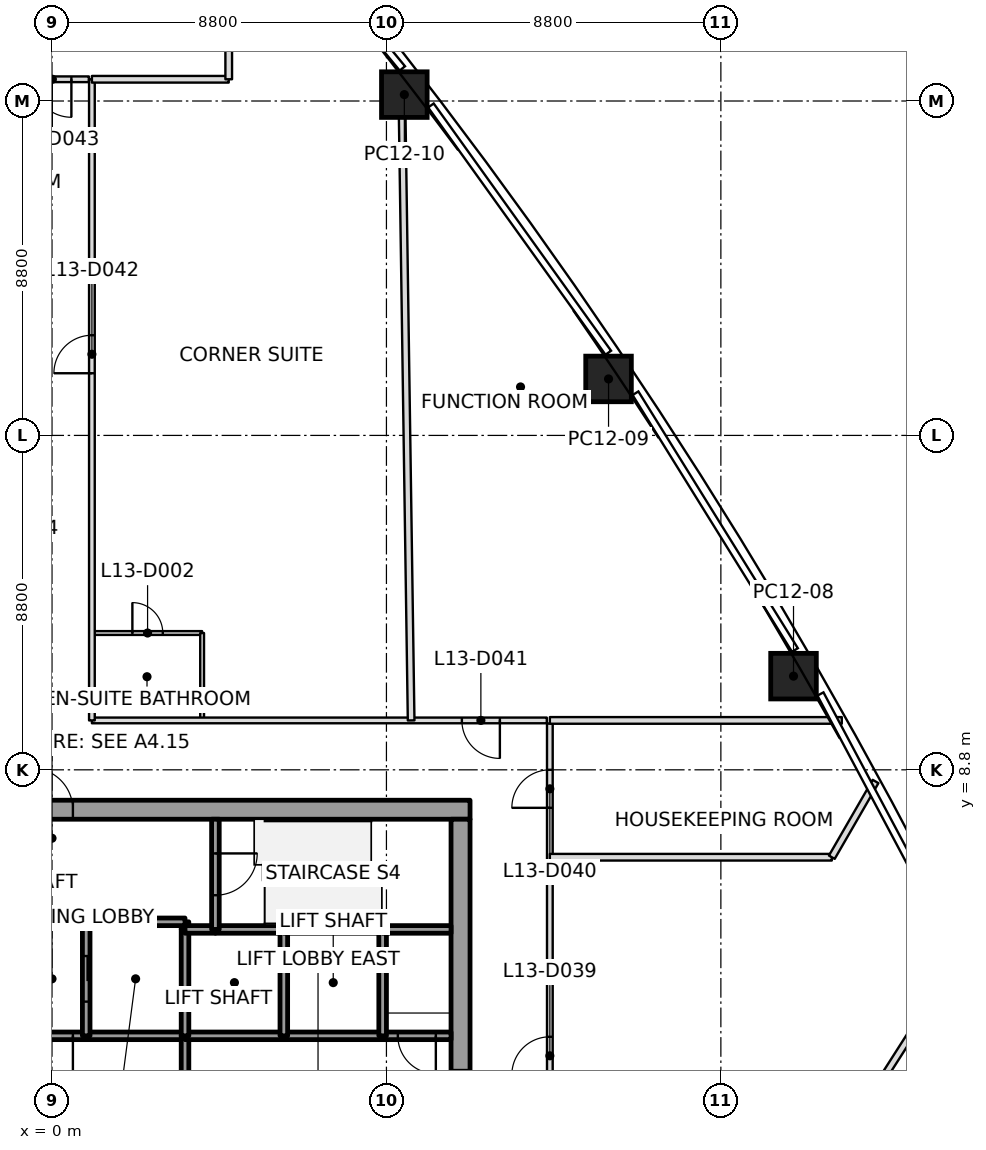
"""IFC4 building model, lengths in metres.
Left out: names, types, materials, properties, quantities, classifications, styles, units other than length and angle.
Written with IfcOpenShell. Run it as: python <this file> out.ifc"""

import sys

from ifc_helpers import new_model, si_unit, direction, frame, frame_2d, origin, origin_2d, place, context, subcontext, project, spatial, rectangle, extrude, element, fill, save


model = new_model("IFC4")
c1 = context("Model", 3, precision=1e-05, world=origin(), true_north=direction((0.0, 1.0)))
c2 = subcontext(c1, "Body", "Model", "MODEL_VIEW")
j1 = project(units=[si_unit("LENGTHUNIT", "METRE"), si_unit("PLANEANGLEUNIT", "RADIAN")], contexts=[c1])
p1 = place(None, origin())
s1 = spatial("IfcSite", under=j1, at=p1, CompositionType="ELEMENT")
p2 = place(p1, origin())
s2 = spatial("IfcBuilding", under=s1, at=p2, CompositionType="ELEMENT")
p3 = place(p2, frame((0.0, 0.0, 70.2)))
s3 = spatial("IfcBuildingStorey", under=s2, at=p3, CompositionType="ELEMENT", Elevation=70.2)
p4 = place(p3, frame((19.512, 11.265, 0.0), z_axis=(-0.010754701703, -0.006136118149, 0.999923339284), x_axis=(-0.499971083262, 0.866042095943, -6.290806e-05)))
e1 = element("IfcColumn", 1, at=p4, inside=s3, PredefinedType="COLUMN", context=c2, shape_type="SweptSolid", body=[
    extrude(rectangle(XDim=1.2, YDim=1.2, at=origin_2d()), origin(), (0.0, 0.0, 1.0), 3.7),
])
p5 = place(p3, frame((14.644, 19.086, 0.0), z_axis=(-0.005674011074, -0.014448935178, 0.999879509676), x_axis=(-0.556135818375, 0.831044265652, 0.008853250663)))
e2 = element("IfcColumn", 2, at=p5, inside=s3, PredefinedType="COLUMN", context=c2, shape_type="SweptSolid", body=[
    extrude(rectangle(XDim=1.2, YDim=1.2, at=origin_2d()), origin(), (0.0, 0.0, 1.0), 3.7),
])
p6 = place(p3, frame((9.271, 26.568, 0.0), z_axis=(-0.000263873276, -0.02236326018, 0.999749876202), x_axis=(-0.609857478762, 0.792316491726, 0.017562247495)))
e3 = element("IfcColumn", 3, at=p6, inside=s3, PredefinedType="COLUMN", context=c2, shape_type="SweptSolid", body=[
    extrude(rectangle(XDim=1.2, YDim=1.2, at=origin_2d()), origin(), (0.0, 0.0, 1.0), 3.701),
])
p7 = place(p3, frame((-11.0, 7.75, 0.0), z_axis=(0.0, 0.0, 1.0), x_axis=(1.0, 0.0, 0.0)))
e4 = element("IfcWall", 4, at=p7, inside=s3, PredefinedType="SHEAR", context=c2, shape_type="SweptSolid", body=[
    extrude(rectangle(XDim=22.0, YDim=0.5, at=frame_2d((11.0, 0.0))), origin(), (0.0, 0.0, 1.0), 3.7),
])
p8 = place(p7, frame((10.45, 0.0, 0.0)))
e5 = element("IfcOpeningElement", 5, at=p8, cuts=e4, PredefinedType="OPENING", context=c2, shape_type="SweptSolid", body=[
    extrude(rectangle(XDim=1.1, YDim=2.1, at=frame_2d((0.55, 1.05))), frame((0.0, 0.25, 0.0), z_axis=(0.0, -1.0, 0.0), x_axis=(1.0, 0.0, 0.0)), (0.0, 0.0, 1.0), 0.5),
])
p9 = place(p3, frame((10.75, -7.5, 0.0), z_axis=(0.0, 0.0, 1.0), x_axis=(0.0, 1.0, 0.0)))
e6 = element("IfcWall", 6, at=p9, inside=s3, PredefinedType="SHEAR", context=c2, shape_type="SweptSolid", body=[
    extrude(rectangle(XDim=15.0, YDim=0.5, at=frame_2d((7.5, 0.0))), origin(), (0.0, 0.0, 1.0), 3.7),
])
p10 = place(p9, frame((6.6, 0.0, 0.0)))
e7 = element("IfcOpeningElement", 7, at=p10, cuts=e6, PredefinedType="OPENING", context=c2, shape_type="SweptSolid", body=[
    extrude(rectangle(XDim=1.8, YDim=2.1, at=frame_2d((0.9, 1.05))), frame((0.0, 0.25, 0.0), z_axis=(0.0, -1.0, 0.0), x_axis=(1.0, 0.0, 0.0)), (0.0, 0.0, 1.0), 0.5),
])
p11 = place(p3, frame((0.9, 1.8, 0.0), z_axis=(0.0, 0.0, 1.0), x_axis=(-1.0, 0.0, 0.0)))
e8 = element("IfcWall", 8, at=p11, inside=s3, PredefinedType="SOLIDWALL", context=c2, shape_type="SweptSolid", body=[
    extrude(rectangle(XDim=1.8, YDim=0.2, at=frame_2d((0.9, 0.0))), origin(), (0.0, 0.0, 1.0), 3.55),
])
p12 = place(p11, frame((0.35, 0.0, 0.0)))
e9 = element("IfcOpeningElement", 9, at=p12, cuts=e8, PredefinedType="OPENING", context=c2, shape_type="SweptSolid", body=[
    extrude(rectangle(XDim=1.1, YDim=2.1, at=frame_2d((0.55, 1.05))), frame((0.0, 0.1, 0.0), z_axis=(0.0, -1.0, 0.0), x_axis=(1.0, 0.0, 0.0)), (0.0, 0.0, 1.0), 0.2),
])
p13 = place(p3, frame((3.5, 1.8, 0.0), z_axis=(0.0, 0.0, 1.0), x_axis=(-1.0, 0.0, 0.0)))
e10 = element("IfcWall", 10, at=p13, inside=s3, PredefinedType="SOLIDWALL", context=c2, shape_type="SweptSolid", body=[
    extrude(rectangle(XDim=2.6, YDim=0.2, at=frame_2d((1.3, 0.0))), origin(), (0.0, 0.0, 1.0), 3.55),
])
p14 = place(p3, frame((3.5, 4.6, 0.0), z_axis=(0.0, 0.0, 1.0), x_axis=(0.0, 1.0, 0.0)))
e11 = element("IfcWall", 11, at=p14, inside=s3, PredefinedType="SOLIDWALL", context=c2, shape_type="SweptSolid", body=[
    extrude(rectangle(XDim=0.2, YDim=0.2, at=frame_2d((0.1, 0.0))), origin(), (0.0, 0.0, 1.0), 3.55),
])
p15 = place(p3, frame((3.5, 4.8, 0.0), z_axis=(0.0, 0.0, 1.0), x_axis=(-1.0, 0.0, 0.0)))
e12 = element("IfcWall", 12, at=p15, inside=s3, PredefinedType="SOLIDWALL", context=c2, shape_type="SweptSolid", body=[
    extrude(rectangle(XDim=2.6, YDim=0.2, at=frame_2d((1.3, 0.0))), origin(), (0.0, 0.0, 1.0), 3.55),
])
p16 = place(p3, frame((0.9, 4.8, 0.0), z_axis=(0.0, 0.0, 1.0), x_axis=(0.0, -1.0, 0.0)))
e13 = element("IfcWall", 13, at=p16, inside=s3, PredefinedType="SOLIDWALL", context=c2, shape_type="SweptSolid", body=[
    extrude(rectangle(XDim=3.0, YDim=0.2, at=frame_2d((1.5, 0.0))), origin(), (0.0, 0.0, 1.0), 3.55),
])
p17 = place(p16, frame((0.9, 0.0, 0.0)))
e14 = element("IfcOpeningElement", 14, at=p17, cuts=e13, PredefinedType="OPENING", context=c2, shape_type="SweptSolid", body=[
    extrude(rectangle(XDim=1.2, YDim=2.1, at=frame_2d((0.6, 1.05))), frame((0.0, 0.1, 0.0), z_axis=(0.0, -1.0, 0.0), x_axis=(1.0, 0.0, 0.0)), (0.0, 0.0, 1.0), 0.2),
])
p18 = place(p3, frame((3.5, -1.8, 0.0), z_axis=(0.0, 0.0, 1.0), x_axis=(0.0, 1.0, 0.0)))
e15 = element("IfcWall", 15, at=p18, inside=s3, PredefinedType="SOLIDWALL", context=c2, shape_type="SweptSolid", body=[
    extrude(rectangle(XDim=3.6, YDim=0.2, at=frame_2d((1.8, 0.0))), origin(), (0.0, 0.0, 1.0), 3.55),
])
p19 = place(p18, frame((1.05, 0.0, 0.0)))
e16 = element("IfcOpeningElement", 16, at=p19, cuts=e15, PredefinedType="OPENING", context=c2, shape_type="SweptSolid", body=[
    extrude(rectangle(XDim=1.5, YDim=2.1, at=frame_2d((0.75, 1.05))), frame((0.0, 0.1, 0.0), z_axis=(0.0, -1.0, 0.0), x_axis=(1.0, 0.0, 0.0)), (0.0, 0.0, 1.0), 0.2),
])
p20 = place(p3, frame((6.1, 1.8, 0.0), z_axis=(0.0, 0.0, 1.0), x_axis=(-1.0, 0.0, 0.0)))
e17 = element("IfcWall", 17, at=p20, inside=s3, PredefinedType="SOLIDWALL", context=c2, shape_type="SweptSolid", body=[
    extrude(rectangle(XDim=2.6, YDim=0.2, at=frame_2d((1.3, 0.0))), origin(), (0.0, 0.0, 1.0), 3.55),
])
p21 = place(p3, frame((3.5, 1.8, 0.0), z_axis=(0.0, 0.0, 1.0), x_axis=(0.0, 1.0, 0.0)))
e18 = element("IfcWall", 18, at=p21, inside=s3, PredefinedType="SOLIDWALL", context=c2, shape_type="SweptSolid", body=[
    extrude(rectangle(XDim=2.8, YDim=0.2, at=frame_2d((1.4, 0.0))), origin(), (0.0, 0.0, 1.0), 3.55),
])
p22 = place(p3, frame((4.3, 4.6, 0.0), z_axis=(0.0, 0.0, 1.0), x_axis=(-1.0, 0.0, 0.0)))
e19 = element("IfcWall", 19, at=p22, inside=s3, PredefinedType="SOLIDWALL", context=c2, shape_type="SweptSolid", body=[
    extrude(rectangle(XDim=0.8, YDim=0.2, at=frame_2d((0.4, 0.0))), origin(), (0.0, 0.0, 1.0), 3.55),
])
p23 = place(p3, frame((6.1, 4.6, 0.0), z_axis=(0.0, 0.0, 1.0), x_axis=(-1.0, 0.0, 0.0)))
e20 = element("IfcWall", 20, at=p23, inside=s3, PredefinedType="SOLIDWALL", context=c2, shape_type="SweptSolid", body=[
    extrude(rectangle(XDim=1.8, YDim=0.2, at=frame_2d((0.9, 0.0))), origin(), (0.0, 0.0, 1.0), 3.55),
])
p24 = place(p3, frame((4.3, 7.5, 0.0), z_axis=(0.0, 0.0, 1.0), x_axis=(0.0, -1.0, 0.0)))
e21 = element("IfcWall", 21, at=p24, inside=s3, PredefinedType="SOLIDWALL", context=c2, shape_type="SweptSolid", body=[
    extrude(rectangle(XDim=2.9, YDim=0.2, at=frame_2d((1.45, 0.0))), origin(), (0.0, 0.0, 1.0), 3.55),
])
p25 = place(p24, frame((0.9, 0.0, 0.0)))
e22 = element("IfcOpeningElement", 22, at=p25, cuts=e21, PredefinedType="OPENING", context=c2, shape_type="SweptSolid", body=[
    extrude(rectangle(XDim=1.1, YDim=2.1, at=frame_2d((0.55, 1.05))), frame((0.0, 0.1, 0.0), z_axis=(0.0, -1.0, 0.0), x_axis=(1.0, 0.0, 0.0)), (0.0, 0.0, 1.0), 0.2),
])
p26 = place(p3, frame((8.7, 1.8, 0.0), z_axis=(0.0, 0.0, 1.0), x_axis=(-1.0, 0.0, 0.0)))
e23 = element("IfcWall", 23, at=p26, inside=s3, PredefinedType="SOLIDWALL", context=c2, shape_type="SweptSolid", body=[
    extrude(rectangle(XDim=2.6, YDim=0.2, at=frame_2d((1.3, 0.0))), origin(), (0.0, 0.0, 1.0), 3.55),
])
p27 = place(p3, frame((6.1, 1.8, 0.0), z_axis=(0.0, 0.0, 1.0), x_axis=(0.0, 1.0, 0.0)))
e24 = element("IfcWall", 24, at=p27, inside=s3, PredefinedType="SOLIDWALL", context=c2, shape_type="SweptSolid", body=[
    extrude(rectangle(XDim=2.8, YDim=0.2, at=frame_2d((1.4, 0.0))), origin(), (0.0, 0.0, 1.0), 3.55),
])
p28 = place(p3, frame((8.7, 4.6, 0.0), z_axis=(0.0, 0.0, 1.0), x_axis=(-1.0, 0.0, 0.0)))
e25 = element("IfcWall", 25, at=p28, inside=s3, PredefinedType="SOLIDWALL", context=c2, shape_type="SweptSolid", body=[
    extrude(rectangle(XDim=2.6, YDim=0.2, at=frame_2d((1.3, 0.0))), origin(), (0.0, 0.0, 1.0), 3.55),
])
p29 = place(p3, frame((10.5, 1.8, 0.0), z_axis=(0.0, 0.0, 1.0), x_axis=(-1.0, 0.0, 0.0)))
e26 = element("IfcWall", 26, at=p29, inside=s3, PredefinedType="SOLIDWALL", context=c2, shape_type="SweptSolid", body=[
    extrude(rectangle(XDim=1.8, YDim=0.2, at=frame_2d((0.9, 0.0))), origin(), (0.0, 0.0, 1.0), 3.55),
])
p30 = place(p29, frame((0.4, 0.0, 0.0)))
e27 = element("IfcOpeningElement", 27, at=p30, cuts=e26, PredefinedType="OPENING", context=c2, shape_type="SweptSolid", body=[
    extrude(rectangle(XDim=1.0, YDim=2.1, at=frame_2d((0.5, 1.05))), frame((0.0, 0.1, 0.0), z_axis=(0.0, -1.0, 0.0), x_axis=(1.0, 0.0, 0.0)), (0.0, 0.0, 1.0), 0.2),
])
p31 = place(p3, frame((8.7, 4.6, 0.0), z_axis=(0.0, 0.0, 1.0), x_axis=(0.0, -1.0, 0.0)))
e28 = element("IfcWall", 28, at=p31, inside=s3, PredefinedType="SOLIDWALL", context=c2, shape_type="SweptSolid", body=[
    extrude(rectangle(XDim=2.8, YDim=0.2, at=frame_2d((1.4, 0.0))), origin(), (0.0, 0.0, 1.0), 3.55),
])
p32 = place(p3, frame((10.5, 4.6, 0.0), z_axis=(0.0, 0.0, 1.0), x_axis=(-1.0, 0.0, 0.0)))
e29 = element("IfcWall", 29, at=p32, inside=s3, PredefinedType="SOLIDWALL", context=c2, shape_type="SweptSolid", body=[
    extrude(rectangle(XDim=1.8, YDim=0.2, at=frame_2d((0.9, 0.0))), origin(), (0.0, 0.0, 1.0), 3.55),
])
p33 = place(p3, frame((1.05, 26.972, 0.0), z_axis=(0.0, 0.0, 1.0), x_axis=(1.0, 0.0, 0.0)))
e30 = element("IfcWall", 30, at=p33, inside=s3, PredefinedType="PARTITIONING", context=c2, shape_type="SweptSolid", body=[
    extrude(rectangle(XDim=3.6, YDim=0.175, at=frame_2d((1.8, 0.0))), origin(), (0.0, 0.0, 1.0), 3.0),
])
p34 = place(p3, frame((4.65, 26.972, 0.0), z_axis=(0.0, 0.0, 1.0), x_axis=(0.0, 1.0, 0.0)))
e31 = element("IfcWall", 31, at=p34, inside=s3, PredefinedType="PARTITIONING", context=c2, shape_type="SweptSolid", body=[
    extrude(rectangle(XDim=6.093, YDim=0.175, at=frame_2d((3.046, 0.0))), origin(), (0.0, 0.0, 1.0), 2.934),
])
p35 = place(p3, frame((9.197, 27.185, 0.0), z_axis=(0.0, 0.0, 1.0), x_axis=(0.014803030732, -0.999890429138, 0.0)))
e32 = element("IfcWall", 32, at=p35, inside=s3, PredefinedType="PARTITIONING", context=c2, shape_type="SweptSolid", body=[
    extrude(rectangle(XDim=17.086, YDim=0.175, at=frame_2d((8.543, 0.0))), origin(), (0.0, 0.0, 1.0), 2.947),
])
p36 = place(p3, frame((13.1, 6.5, 0.0), z_axis=(0.0, 0.0, 1.0), x_axis=(1.0, 0.0, 0.0)))
e33 = element("IfcWall", 33, at=p36, inside=s3, PredefinedType="PARTITIONING", context=c2, shape_type="SweptSolid", body=[
    extrude(rectangle(XDim=7.419, YDim=0.175, at=frame_2d((3.709, 0.0))), origin(), (0.0, 0.0, 1.0), 3.0),
])
p37 = place(p3, frame((20.519, 6.5, 0.0), z_axis=(0.0, 0.0, 1.0), x_axis=(0.500040764516, 0.866001867101, 0.0)))
e34 = element("IfcWall", 34, at=p37, inside=s3, PredefinedType="PARTITIONING", context=c2, shape_type="SweptSolid", body=[
    extrude(rectangle(XDim=2.302, YDim=0.175, at=frame_2d((1.151, 0.0))), origin(), (0.0, 0.0, 1.0), 2.934),
])
p38 = place(p3, frame((13.1, 10.1, 0.0), z_axis=(0.0, 0.0, 1.0), x_axis=(1.0, 0.0, 0.0)))
e35 = element("IfcWall", 35, at=p38, inside=s3, PredefinedType="PARTITIONING", context=c2, shape_type="SweptSolid", body=[
    extrude(rectangle(XDim=7.682, YDim=0.175, at=frame_2d((3.841, 0.0))), origin(), (0.0, 0.0, 1.0), 2.934),
])
p39 = place(p3, frame((23.851, 3.796, 0.0), z_axis=(0.0, 0.0, 1.0), x_axis=(-0.538388937406, -0.84269647684, 0.0)))
e36 = element("IfcWall", 36, at=p39, inside=s3, PredefinedType="PARTITIONING", context=c2, shape_type="SweptSolid", body=[
    extrude(rectangle(XDim=14.177, YDim=0.175, at=frame_2d((7.089, 0.0))), origin(), (0.0, 0.0, 1.0), 2.947),
])
p40 = place(p3, frame((0.97, 26.972, 0.0), z_axis=(0.0, 0.0, 1.0), x_axis=(-1.0, 0.0, 0.0)))
e37 = element("IfcWall", 37, at=p40, inside=s3, PredefinedType="PARTITIONING", context=c2, shape_type="SweptSolid", body=[
    extrude(rectangle(XDim=2.02, YDim=0.15, at=frame_2d((1.01, 0.0))), origin(), (0.0, 0.0, 1.0), 2.797),
])
p41 = place(p40, frame((0.46, 0.0, 0.0)))
e38 = element("IfcOpeningElement", 38, at=p41, cuts=e37, PredefinedType="OPENING", context=c2, shape_type="SweptSolid", body=[
    extrude(rectangle(XDim=1.0, YDim=2.1, at=frame_2d((0.5, 1.05))), frame((0.0, 0.075, 0.0), z_axis=(0.0, -1.0, 0.0), x_axis=(1.0, 0.0, 0.0)), (0.0, 0.0, 1.0), 0.15),
])
p42 = place(p3, frame((13.02, 10.1, 0.0), z_axis=(0.0, 0.0, 1.0), x_axis=(-1.0, 0.0, 0.0)))
e39 = element("IfcWall", 39, at=p42, inside=s3, PredefinedType="PARTITIONING", context=c2, shape_type="SweptSolid", body=[
    extrude(rectangle(XDim=11.97, YDim=0.15, at=frame_2d((5.985, 0.0))), origin(), (0.0, 0.0, 1.0), 2.947),
])
p43 = place(p42, frame((1.235, 0.0, 0.0)))
e40 = element("IfcOpeningElement", 40, at=p43, cuts=e39, PredefinedType="OPENING", context=c2, shape_type="SweptSolid", body=[
    extrude(rectangle(XDim=1.0, YDim=2.1, at=frame_2d((0.5, 1.05))), frame((0.0, 0.075, 0.0), z_axis=(0.0, -1.0, 0.0), x_axis=(1.0, 0.0, 0.0)), (0.0, 0.0, 1.0), 0.15),
])
p44 = place(p3, frame((1.05, 10.1, 0.0), z_axis=(0.0, 0.0, 1.0), x_axis=(0.0, 1.0, 0.0)))
e41 = element("IfcWall", 41, at=p44, inside=s3, PredefinedType="PARTITIONING", context=c2, shape_type="SweptSolid", body=[
    extrude(rectangle(XDim=16.872, YDim=0.15, at=frame_2d((8.436, 0.0))), origin(), (0.0, 0.0, 1.0), 2.947),
])
p45 = place(p44, frame((9.136, 0.0, 0.0)))
e42 = element("IfcOpeningElement", 42, at=p45, cuts=e41, PredefinedType="OPENING", context=c2, shape_type="SweptSolid", body=[
    extrude(rectangle(XDim=1.0, YDim=2.1, at=frame_2d((0.5, 1.05))), frame((0.0, 0.075, 0.0), z_axis=(0.0, -1.0, 0.0), x_axis=(1.0, 0.0, 0.0)), (0.0, 0.0, 1.0), 0.15),
])
p46 = place(p3, frame((13.1, -6.351, 0.0), z_axis=(0.0, 0.0, 1.0), x_axis=(0.0, 1.0, 0.0)))
e43 = element("IfcWall", 43, at=p46, inside=s3, PredefinedType="PARTITIONING", context=c2, shape_type="SweptSolid", body=[
    extrude(rectangle(XDim=16.371, YDim=0.15, at=frame_2d((8.186, 0.0))), origin(), (0.0, 0.0, 1.0), 3.0),
])
p47 = place(p46, frame((7.125, 0.0, 0.0)))
e44 = element("IfcOpeningElement", 44, at=p47, cuts=e43, PredefinedType="OPENING", context=c2, shape_type="SweptSolid", body=[
    extrude(rectangle(XDim=1.0, YDim=2.1, at=frame_2d((0.5, 1.05))), frame((0.0, 0.075, 0.0), z_axis=(0.0, -1.0, 0.0), x_axis=(1.0, 0.0, 0.0)), (0.0, 0.0, 1.0), 0.15),
])
p48 = place(p46, frame((14.151, 0.0, 0.0)))
e45 = element("IfcOpeningElement", 45, at=p48, cuts=e43, PredefinedType="OPENING", context=c2, shape_type="SweptSolid", body=[
    extrude(rectangle(XDim=1.0, YDim=2.1, at=frame_2d((0.5, 1.05))), frame((0.0, 0.075, 0.0), z_axis=(0.0, -1.0, 0.0), x_axis=(1.0, 0.0, 0.0)), (0.0, 0.0, 1.0), 0.15),
])
p49 = place(p3, frame((1.08, 12.4, 0.0), z_axis=(0.0, 0.0, 1.0), x_axis=(1.0, 0.0, 0.0)))
e46 = element("IfcWall", 46, at=p49, inside=s3, PredefinedType="PARTITIONING", context=c2, shape_type="SweptSolid", body=[
    extrude(rectangle(XDim=2.87, YDim=0.1, at=frame_2d((1.435, 0.0))), origin(), (0.0, 0.0, 1.0), 3.0),
])
p50 = place(p49, frame((1.035, 0.0, 0.0)))
e47 = element("IfcOpeningElement", 47, at=p50, cuts=e46, PredefinedType="OPENING", context=c2, shape_type="SweptSolid", body=[
    extrude(rectangle(XDim=0.8, YDim=2.1, at=frame_2d((0.4, 1.05))), frame((0.0, 0.05, 0.0), z_axis=(0.0, -1.0, 0.0), x_axis=(1.0, 0.0, 0.0)), (0.0, 0.0, 1.0), 0.1),
])
p51 = place(p3, frame((3.95, 12.4, 0.0), z_axis=(0.0, 0.0, 1.0), x_axis=(0.0, -1.0, 0.0)))
e48 = element("IfcWall", 48, at=p51, inside=s3, PredefinedType="PARTITIONING", context=c2, shape_type="SweptSolid", body=[
    extrude(rectangle(XDim=2.27, YDim=0.1, at=frame_2d((1.135, 0.0))), origin(), (0.0, 0.0, 1.0), 3.0),
])
p52 = place(p47, origin())
e49 = element("IfcDoor", 49, at=p52, inside=s3, OperationType="SINGLE_SWING_LEFT", PredefinedType="DOOR", context=c2, shape_type="SweptSolid", body=[
    extrude(rectangle(XDim=1.0, YDim=2.1, at=frame_2d((0.5, 1.05))), frame((0.0, 0.025, 0.0), z_axis=(0.0, -1.0, 0.0), x_axis=(1.0, 0.0, 0.0)), (0.0, 0.0, 1.0), 0.05),
])
fill(e44, e49)
p53 = place(p48, origin())
e50 = element("IfcDoor", 50, at=p53, inside=s3, OperationType="SINGLE_SWING_RIGHT", PredefinedType="DOOR", context=c2, shape_type="SweptSolid", body=[
    extrude(rectangle(XDim=1.0, YDim=2.1, at=frame_2d((0.5, 1.05))), frame((0.0, 0.025, 0.0), z_axis=(0.0, -1.0, 0.0), x_axis=(1.0, 0.0, 0.0)), (0.0, 0.0, 1.0), 0.05),
])
fill(e45, e50)
p54 = place(p43, origin())
e51 = element("IfcDoor", 51, at=p54, inside=s3, OperationType="SINGLE_SWING_LEFT", PredefinedType="DOOR", context=c2, shape_type="SweptSolid", body=[
    extrude(rectangle(XDim=1.0, YDim=2.1, at=frame_2d((0.5, 1.05))), frame((0.0, 0.025, 0.0), z_axis=(0.0, -1.0, 0.0), x_axis=(1.0, 0.0, 0.0)), (0.0, 0.0, 1.0), 0.05),
])
fill(e40, e51)
p55 = place(p45, origin())
e52 = element("IfcDoor", 52, at=p55, inside=s3, OperationType="SINGLE_SWING_RIGHT", PredefinedType="DOOR", context=c2, shape_type="SweptSolid", body=[
    extrude(rectangle(XDim=1.0, YDim=2.1, at=frame_2d((0.5, 1.05))), frame((0.0, 0.025, 0.0), z_axis=(0.0, -1.0, 0.0), x_axis=(1.0, 0.0, 0.0)), (0.0, 0.0, 1.0), 0.05),
])
fill(e42, e52)
p56 = place(p50, origin())
e53 = element("IfcDoor", 53, at=p56, inside=s3, OperationType="SINGLE_SWING_LEFT", PredefinedType="DOOR", context=c2, shape_type="SweptSolid", body=[
    extrude(rectangle(XDim=0.8, YDim=2.1, at=frame_2d((0.4, 1.05))), frame((0.0, 0.025, 0.0), z_axis=(0.0, -1.0, 0.0), x_axis=(1.0, 0.0, 0.0)), (0.0, 0.0, 1.0), 0.05),
])
fill(e47, e53)
p57 = place(p41, origin())
e54 = element("IfcDoor", 54, at=p57, inside=s3, OperationType="SINGLE_SWING_LEFT", PredefinedType="DOOR", context=c2, shape_type="SweptSolid", body=[
    extrude(rectangle(XDim=1.0, YDim=2.1, at=frame_2d((0.5, 1.05))), frame((0.0, 0.025, 0.0), z_axis=(0.0, -1.0, 0.0), x_axis=(1.0, 0.0, 0.0)), (0.0, 0.0, 1.0), 0.05),
])
fill(e38, e54)
p58 = place(p17, origin())
e55 = element("IfcDoor", 55, at=p58, inside=s3, OperationType="SLIDING_TO_RIGHT", PredefinedType="DOOR", context=c2, shape_type="SweptSolid", body=[
    extrude(rectangle(XDim=1.2, YDim=2.1, at=frame_2d((0.6, 1.05))), frame((0.0, 0.025, 0.0), z_axis=(0.0, -1.0, 0.0), x_axis=(1.0, 0.0, 0.0)), (0.0, 0.0, 1.0), 0.05),
])
fill(e14, e55)
p59 = place(p12, origin())
e56 = element("IfcDoor", 56, at=p59, inside=s3, OperationType="SINGLE_SWING_RIGHT", PredefinedType="DOOR", context=c2, shape_type="SweptSolid", body=[
    extrude(rectangle(XDim=1.1, YDim=2.1, at=frame_2d((0.55, 1.05))), frame((0.0, 0.025, 0.0), z_axis=(0.0, -1.0, 0.0), x_axis=(1.0, 0.0, 0.0)), (0.0, 0.0, 1.0), 0.05),
])
fill(e9, e56)
p60 = place(p30, origin())
e57 = element("IfcDoor", 57, at=p60, inside=s3, OperationType="SINGLE_SWING_RIGHT", PredefinedType="DOOR", context=c2, shape_type="SweptSolid", body=[
    extrude(rectangle(XDim=1.0, YDim=2.1, at=frame_2d((0.5, 1.05))), frame((0.0, 0.025, 0.0), z_axis=(0.0, -1.0, 0.0), x_axis=(1.0, 0.0, 0.0)), (0.0, 0.0, 1.0), 0.05),
])
fill(e27, e57)
p61 = place(p25, origin())
e58 = element("IfcDoor", 58, at=p61, inside=s3, OperationType="SINGLE_SWING_RIGHT", PredefinedType="DOOR", context=c2, shape_type="SweptSolid", body=[
    extrude(rectangle(XDim=1.1, YDim=2.1, at=frame_2d((0.55, 1.05))), frame((0.0, 0.025, 0.0), z_axis=(0.0, -1.0, 0.0), x_axis=(1.0, 0.0, 0.0)), (0.0, 0.0, 1.0), 0.05),
])
fill(e22, e58)
p62 = place(p10, origin())
e59 = element("IfcDoor", 59, at=p62, inside=s3, OperationType="DOUBLE_DOOR_SINGLE_SWING", PredefinedType="DOOR", context=c2, shape_type="SweptSolid", body=[
    extrude(rectangle(XDim=1.8, YDim=2.1, at=frame_2d((0.9, 1.05))), frame((0.0, 0.025, 0.0), z_axis=(0.0, -1.0, 0.0), x_axis=(1.0, 0.0, 0.0)), (0.0, 0.0, 1.0), 0.05),
])
fill(e7, e59)
p63 = place(p8, origin())
e60 = element("IfcDoor", 60, at=p63, inside=s3, OperationType="SINGLE_SWING_RIGHT", PredefinedType="DOOR", context=c2, shape_type="SweptSolid", body=[
    extrude(rectangle(XDim=1.1, YDim=2.1, at=frame_2d((0.55, 1.05))), frame((0.0, 0.025, 0.0), z_axis=(0.0, -1.0, 0.0), x_axis=(1.0, 0.0, 0.0)), (0.0, 0.0, 1.0), 0.05),
])
fill(e5, e60)
save(model, sys.argv[1])
